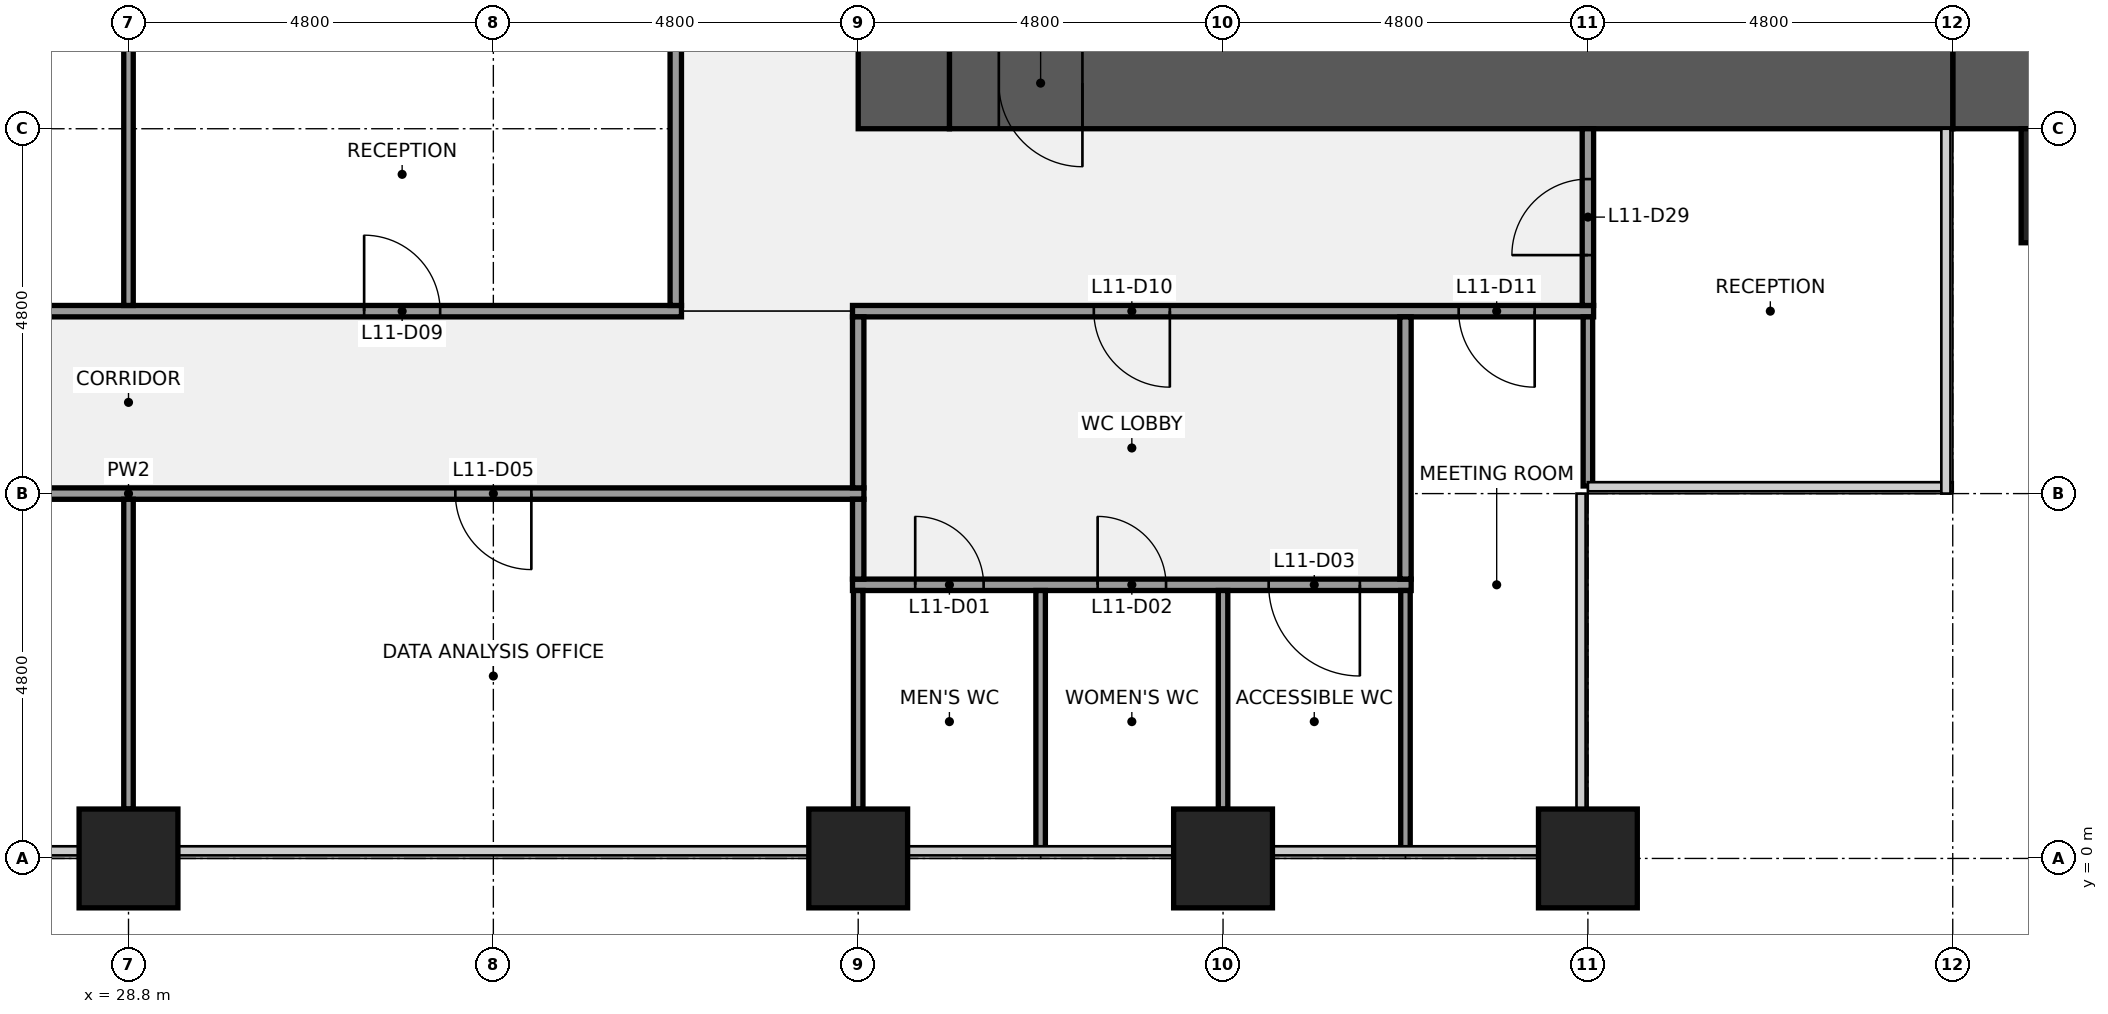
"""IFC4 building model, lengths in metres.
Left out: names, types, materials, properties, quantities, classifications, styles, units other than length and angle.
Written with IfcOpenShell. Run it as: python <this file> out.ifc"""

import sys

from ifc_helpers import new_model, si_unit, direction, frame, frame_2d, origin, origin_2d, place, context, subcontext, project, spatial, rectangle, extrude, element, fill, save


model = new_model("IFC4")
c1 = context("Model", 3, precision=1e-05, world=origin(), true_north=direction((0.0, 1.0)))
c2 = subcontext(c1, "Body", "Model", "MODEL_VIEW")
j1 = project(units=[si_unit("LENGTHUNIT", "METRE"), si_unit("PLANEANGLEUNIT", "RADIAN")], contexts=[c1])
p1 = place(None, origin())
s1 = spatial("IfcSite", under=j1, at=p1, CompositionType="ELEMENT")
p2 = place(p1, origin())
s2 = spatial("IfcBuilding", under=s1, at=p2, CompositionType="ELEMENT")
p3 = place(p2, frame((0.0, 0.0, 55.0)))
s3 = spatial("IfcBuildingStorey", under=s2, at=p3, CompositionType="ELEMENT", Elevation=55.0)
for number, where, z_axis, x_axis in (
    (1, (28.8, 0.0, 0.0), (0.0, 0.0, 1.0), (1.0, 0.0, 0.0)),
    (2, (38.4, 0.0, 0.0), (0.0, 0.0, 1.0), (1.0, 0.0, 0.0)),
    (3, (43.2, 0.0, 0.0), (0.0, 0.0, 1.0), (1.0, 0.0, 0.0)),
    (4, (48.0, 0.0, 0.0), (0.0, 0.0, 1.0), (1.0, 0.0, 0.0)),
):
    element("IfcColumn", number, at=place(p3, frame(where, z_axis=z_axis, x_axis=x_axis)), inside=s3, PredefinedType="COLUMN", context=c2, shape_type="SweptSolid", body=[
        extrude(rectangle(XDim=1.3, YDim=1.3, at=origin_2d()), origin(), (0.0, 0.0, 1.0), 4.0),
    ])
p4 = place(p3, frame((56.4, 10.2, 0.0), z_axis=(0.0, 0.0, 1.0), x_axis=(-1.0, 0.0, 0.0)))
e5 = element("IfcWall", 5, at=p4, inside=s3, PredefinedType="SHEAR", context=c2, shape_type="SweptSolid", body=[
    extrude(rectangle(XDim=3.6, YDim=1.2, at=frame_2d((1.8, 0.0))), origin(), (0.0, 0.0, 1.0), 3.84),
])
p5 = place(p3, frame((52.8, 10.2, 0.0), z_axis=(0.0, 0.0, 1.0), x_axis=(-1.0, 0.0, 0.0)))
e6 = element("IfcWall", 6, at=p5, inside=s3, PredefinedType="SHEAR", context=c2, shape_type="SweptSolid", body=[
    extrude(rectangle(XDim=13.2, YDim=1.2, at=frame_2d((6.6, 0.0))), origin(), (0.0, 0.0, 1.0), 3.84),
])
p6 = place(p5, frame((11.45, 0.0, 0.0)))
e7 = element("IfcOpeningElement", 7, at=p6, cuts=e6, PredefinedType="OPENING", context=c2, shape_type="SweptSolid", body=[
    extrude(rectangle(XDim=1.1, YDim=2.1, at=frame_2d((0.55, 1.05))), frame((0.0, 0.61, 0.0), z_axis=(0.0, -1.0, 0.0), x_axis=(1.0, 0.0, 0.0)), (0.0, 0.0, 1.0), 1.22),
])
p7 = place(p3, frame((39.0, 9.6, 0.0), z_axis=(0.0, 0.0, 1.0), x_axis=(0.0, 1.0, 0.0)))
e8 = element("IfcWall", 8, at=p7, inside=s3, PredefinedType="SHEAR", context=c2, shape_type="SweptSolid", body=[
    extrude(rectangle(XDim=28.8, YDim=1.2, at=frame_2d((14.4, 0.0))), origin(), (0.0, 0.0, 1.0), 3.84),
])
p8 = place(p7, frame((8.7, 0.0, 0.0)))
e9 = element("IfcOpeningElement", 9, at=p8, cuts=e8, PredefinedType="OPENING", context=c2, shape_type="SweptSolid", body=[
    extrude(rectangle(XDim=1.8, YDim=2.1, at=frame_2d((0.9, 1.05))), frame((0.0, 0.61, 0.0), z_axis=(0.0, -1.0, 0.0), x_axis=(1.0, 0.0, 0.0)), (0.0, 0.0, 1.0), 1.22),
])
p9 = place(p7, frame((18.3, 0.0, 0.0)))
e10 = element("IfcOpeningElement", 10, at=p9, cuts=e8, PredefinedType="OPENING", context=c2, shape_type="SweptSolid", body=[
    extrude(rectangle(XDim=1.8, YDim=2.1, at=frame_2d((0.9, 1.05))), frame((0.0, 0.61, 0.0), z_axis=(0.0, -1.0, 0.0), x_axis=(1.0, 0.0, 0.0)), (0.0, 0.0, 1.0), 1.22),
])
p10 = place(p3, frame((38.325, 3.6, 0.0), z_axis=(0.0, 0.0, 1.0), x_axis=(1.0, 0.0, 0.0)))
e11 = element("IfcWall", 11, at=p10, inside=s3, PredefinedType="PARTITIONING", context=c2, shape_type="SweptSolid", body=[
    extrude(rectangle(XDim=7.35, YDim=0.15, at=frame_2d((3.675, 0.0))), origin(), (0.0, 0.0, 1.0), 2.849),
])
p11 = place(p10, frame((0.825, 0.0, 0.0)))
e12 = element("IfcOpeningElement", 12, at=p11, cuts=e11, PredefinedType="OPENING", context=c2, shape_type="SweptSolid", body=[
    extrude(rectangle(XDim=0.9, YDim=2.1, at=frame_2d((0.45, 1.05))), frame((0.0, 0.085, 0.0), z_axis=(0.0, -1.0, 0.0), x_axis=(1.0, 0.0, 0.0)), (0.0, 0.0, 1.0), 0.17),
])
p12 = place(p10, frame((3.225, 0.0, 0.0)))
e13 = element("IfcOpeningElement", 13, at=p12, cuts=e11, PredefinedType="OPENING", context=c2, shape_type="SweptSolid", body=[
    extrude(rectangle(XDim=0.9, YDim=2.1, at=frame_2d((0.45, 1.05))), frame((0.0, 0.085, 0.0), z_axis=(0.0, -1.0, 0.0), x_axis=(1.0, 0.0, 0.0)), (0.0, 0.0, 1.0), 0.17),
])
p13 = place(p10, frame((5.475, 0.0, 0.0)))
e14 = element("IfcOpeningElement", 14, at=p13, cuts=e11, PredefinedType="OPENING", context=c2, shape_type="SweptSolid", body=[
    extrude(rectangle(XDim=1.2, YDim=2.1, at=frame_2d((0.6, 1.05))), frame((0.0, 0.085, 0.0), z_axis=(0.0, -1.0, 0.0), x_axis=(1.0, 0.0, 0.0)), (0.0, 0.0, 1.0), 0.17),
])
p14 = place(p3, frame((19.125, 4.8, 0.0), z_axis=(0.0, 0.0, 1.0), x_axis=(1.0, 0.0, 0.0)))
e15 = element("IfcWall", 15, at=p14, inside=s3, PredefinedType="PARTITIONING", context=c2, shape_type="SweptSolid", body=[
    extrude(rectangle(XDim=19.35, YDim=0.15, at=frame_2d((9.675, 0.0))), origin(), (0.0, 0.0, 1.0), 2.849),
])
p15 = place(p14, frame((4.375, 0.0, 0.0)))
e16 = element("IfcOpeningElement", 16, at=p15, cuts=e15, PredefinedType="OPENING", context=c2, shape_type="SweptSolid", body=[
    extrude(rectangle(XDim=1.0, YDim=2.1, at=frame_2d((0.5, 1.05))), frame((0.0, 0.085, 0.0), z_axis=(0.0, -1.0, 0.0), x_axis=(1.0, 0.0, 0.0)), (0.0, 0.0, 1.0), 0.17),
])
p16 = place(p14, frame((13.975, 0.0, 0.0)))
e17 = element("IfcOpeningElement", 17, at=p16, cuts=e15, PredefinedType="OPENING", context=c2, shape_type="SweptSolid", body=[
    extrude(rectangle(XDim=1.0, YDim=2.1, at=frame_2d((0.5, 1.05))), frame((0.0, 0.085, 0.0), z_axis=(0.0, -1.0, 0.0), x_axis=(1.0, 0.0, 0.0)), (0.0, 0.0, 1.0), 0.17),
])
p17 = place(p3, frame((21.525, 7.2, 0.0), z_axis=(0.0, 0.0, 1.0), x_axis=(1.0, 0.0, 0.0)))
e18 = element("IfcWall", 18, at=p17, inside=s3, PredefinedType="PARTITIONING", context=c2, shape_type="SweptSolid", body=[
    extrude(rectangle(XDim=14.55, YDim=0.15, at=frame_2d((7.275, 0.0))), origin(), (0.0, 0.0, 1.0), 2.849),
])
p18 = place(p17, frame((3.175, 0.0, 0.0)))
e19 = element("IfcOpeningElement", 19, at=p18, cuts=e18, PredefinedType="OPENING", context=c2, shape_type="SweptSolid", body=[
    extrude(rectangle(XDim=1.0, YDim=2.1, at=frame_2d((0.5, 1.05))), frame((0.0, 0.085, 0.0), z_axis=(0.0, -1.0, 0.0), x_axis=(1.0, 0.0, 0.0)), (0.0, 0.0, 1.0), 0.17),
])
p19 = place(p17, frame((10.375, 0.0, 0.0)))
e20 = element("IfcOpeningElement", 20, at=p19, cuts=e18, PredefinedType="OPENING", context=c2, shape_type="SweptSolid", body=[
    extrude(rectangle(XDim=1.0, YDim=2.1, at=frame_2d((0.5, 1.05))), frame((0.0, 0.085, 0.0), z_axis=(0.0, -1.0, 0.0), x_axis=(1.0, 0.0, 0.0)), (0.0, 0.0, 1.0), 0.17),
])
p20 = place(p3, frame((38.325, 7.2, 0.0), z_axis=(0.0, 0.0, 1.0), x_axis=(1.0, 0.0, 0.0)))
e21 = element("IfcWall", 21, at=p20, inside=s3, PredefinedType="PARTITIONING", context=c2, shape_type="SweptSolid", body=[
    extrude(rectangle(XDim=9.75, YDim=0.15, at=frame_2d((4.875, 0.0))), origin(), (0.0, 0.0, 1.0), 2.849),
])
p21 = place(p20, frame((3.175, 0.0, 0.0)))
e22 = element("IfcOpeningElement", 22, at=p21, cuts=e21, PredefinedType="OPENING", context=c2, shape_type="SweptSolid", body=[
    extrude(rectangle(XDim=1.0, YDim=2.1, at=frame_2d((0.5, 1.05))), frame((0.0, 0.085, 0.0), z_axis=(0.0, -1.0, 0.0), x_axis=(1.0, 0.0, 0.0)), (0.0, 0.0, 1.0), 0.17),
])
p22 = place(p20, frame((7.975, 0.0, 0.0)))
e23 = element("IfcOpeningElement", 23, at=p22, cuts=e21, PredefinedType="OPENING", context=c2, shape_type="SweptSolid", body=[
    extrude(rectangle(XDim=1.0, YDim=2.1, at=frame_2d((0.5, 1.05))), frame((0.0, 0.085, 0.0), z_axis=(0.0, -1.0, 0.0), x_axis=(1.0, 0.0, 0.0)), (0.0, 0.0, 1.0), 0.17),
])
p23 = place(p3, frame((28.8, 0.65, 0.0), z_axis=(0.0, 0.0, 1.0), x_axis=(0.0, 1.0, 0.0)))
e24 = element("IfcWall", 24, at=p23, inside=s3, PredefinedType="PARTITIONING", context=c2, shape_type="SweptSolid", body=[
    extrude(rectangle(XDim=4.075, YDim=0.125, at=frame_2d((2.038, 0.0))), origin(), (0.0, 0.0, 1.0), 2.849),
])
p24 = place(p3, frame((28.8, 7.275, 0.0), z_axis=(0.0, 0.0, 1.0), x_axis=(0.0, 1.0, 0.0)))
e25 = element("IfcWall", 25, at=p24, inside=s3, PredefinedType="PARTITIONING", context=c2, shape_type="SweptSolid", body=[
    extrude(rectangle(XDim=3.463, YDim=0.125, at=frame_2d((1.731, 0.0))), origin(), (0.0, 0.0, 1.0), 2.849),
])
p25 = place(p3, frame((36.0, 7.275, 0.0), z_axis=(0.0, 0.0, 1.0), x_axis=(0.0, 1.0, 0.0)))
e26 = element("IfcWall", 26, at=p25, inside=s3, PredefinedType="PARTITIONING", context=c2, shape_type="SweptSolid", body=[
    extrude(rectangle(XDim=3.463, YDim=0.15, at=frame_2d((1.731, 0.0))), origin(), (0.0, 0.0, 1.0), 2.849),
])
p26 = place(p3, frame((38.4, 0.65, 0.0), z_axis=(0.0, 0.0, 1.0), x_axis=(0.0, 1.0, 0.0)))
e27 = element("IfcWall", 27, at=p26, inside=s3, PredefinedType="PARTITIONING", context=c2, shape_type="SweptSolid", body=[
    extrude(rectangle(XDim=2.875, YDim=0.125, at=frame_2d((1.438, 0.0))), origin(), (0.0, 0.0, 1.0), 2.849),
])
p27 = place(p3, frame((38.4, 3.675, 0.0), z_axis=(0.0, 0.0, 1.0), x_axis=(0.0, 1.0, 0.0)))
e28 = element("IfcWall", 28, at=p27, inside=s3, PredefinedType="PARTITIONING", context=c2, shape_type="SweptSolid", body=[
    extrude(rectangle(XDim=1.05, YDim=0.15, at=frame_2d((0.525, 0.0))), origin(), (0.0, 0.0, 1.0), 2.849),
])
p28 = place(p3, frame((38.4, 4.875, 0.0), z_axis=(0.0, 0.0, 1.0), x_axis=(0.0, 1.0, 0.0)))
e29 = element("IfcWall", 29, at=p28, inside=s3, PredefinedType="PARTITIONING", context=c2, shape_type="SweptSolid", body=[
    extrude(rectangle(XDim=2.25, YDim=0.15, at=frame_2d((1.125, 0.0))), origin(), (0.0, 0.0, 1.0), 2.849),
])
p29 = place(p3, frame((40.8, 0.1, 0.0), z_axis=(0.0, 0.0, 1.0), x_axis=(0.0, 1.0, 0.0)))
e30 = element("IfcWall", 30, at=p29, inside=s3, PredefinedType="PARTITIONING", context=c2, shape_type="SweptSolid", body=[
    extrude(rectangle(XDim=3.425, YDim=0.125, at=frame_2d((1.712, 0.0))), origin(), (0.0, 0.0, 1.0), 2.849),
])
p30 = place(p3, frame((43.2, 0.65, 0.0), z_axis=(0.0, 0.0, 1.0), x_axis=(0.0, 1.0, 0.0)))
e31 = element("IfcWall", 31, at=p30, inside=s3, PredefinedType="PARTITIONING", context=c2, shape_type="SweptSolid", body=[
    extrude(rectangle(XDim=2.875, YDim=0.125, at=frame_2d((1.438, 0.0))), origin(), (0.0, 0.0, 1.0), 2.849),
])
p31 = place(p3, frame((45.6, 0.1, 0.0), z_axis=(0.0, 0.0, 1.0), x_axis=(0.0, 1.0, 0.0)))
e32 = element("IfcWall", 32, at=p31, inside=s3, PredefinedType="PARTITIONING", context=c2, shape_type="SweptSolid", body=[
    extrude(rectangle(XDim=3.425, YDim=0.125, at=frame_2d((1.712, 0.0))), origin(), (0.0, 0.0, 1.0), 2.849),
])
p32 = place(p3, frame((45.6, 3.675, 0.0), z_axis=(0.0, 0.0, 1.0), x_axis=(0.0, 1.0, 0.0)))
e33 = element("IfcWall", 33, at=p32, inside=s3, PredefinedType="PARTITIONING", context=c2, shape_type="SweptSolid", body=[
    extrude(rectangle(XDim=3.45, YDim=0.15, at=frame_2d((1.725, 0.0))), origin(), (0.0, 0.0, 1.0), 2.849),
])
p33 = place(p3, frame((48.0, 4.9, 0.0), z_axis=(0.0, 0.0, 1.0), x_axis=(0.0, 1.0, 0.0)))
e34 = element("IfcWall", 34, at=p33, inside=s3, PredefinedType="PARTITIONING", context=c2, shape_type="SweptSolid", body=[
    extrude(rectangle(XDim=2.225, YDim=0.125, at=frame_2d((1.113, 0.0))), origin(), (0.0, 0.0, 1.0), 2.849),
])
p34 = place(p3, frame((48.0, 7.275, 0.0), z_axis=(0.0, 0.0, 1.0), x_axis=(0.0, 1.0, 0.0)))
e35 = element("IfcWall", 35, at=p34, inside=s3, PredefinedType="PARTITIONING", context=c2, shape_type="SweptSolid", body=[
    extrude(rectangle(XDim=2.325, YDim=0.15, at=frame_2d((1.163, 0.0))), origin(), (0.0, 0.0, 1.0), 2.849),
])
p35 = place(p34, frame((0.663, 0.0, 0.0)))
e36 = element("IfcOpeningElement", 36, at=p35, cuts=e35, PredefinedType="OPENING", context=c2, shape_type="SweptSolid", body=[
    extrude(rectangle(XDim=1.0, YDim=2.1, at=frame_2d((0.5, 1.05))), frame((0.0, 0.085, 0.0), z_axis=(0.0, -1.0, 0.0), x_axis=(1.0, 0.0, 0.0)), (0.0, 0.0, 1.0), 0.17),
])
p36 = place(p3, frame((55.2, 8.85, 0.0), z_axis=(0.0, 0.0, 1.0), x_axis=(1.0, 0.0, 0.0)))
e37 = element("IfcColumn", 37, at=p36, inside=s3, PredefinedType="PILASTER", context=c2, shape_type="SweptSolid", body=[
    extrude(rectangle(XDim=3.0, YDim=1.5, at=origin_2d()), origin(), (0.0, 0.0, 1.0), 4.0),
])
for number, where, z_axis, x_axis in (
    (38, (38.4, -1.075, 0.0), (0.0, 0.0, 1.0), (1.0, 0.0, 0.0)),
    (39, (43.2, -1.075, 0.0), (0.0, 0.0, 1.0), (1.0, 0.0, 0.0)),
    (40, (48.0, -1.075, 0.0), (0.0, 0.0, 1.0), (1.0, 0.0, 0.0)),
):
    element("IfcColumn", number, at=place(p3, frame(where, z_axis=z_axis, x_axis=x_axis)), inside=s3, PredefinedType="PILASTER", context=c2, shape_type="SweptSolid", body=[
        extrude(rectangle(XDim=4.2, YDim=0.85, at=origin_2d()), origin(), (0.0, 0.0, 1.0), 4.0),
    ])
p37 = place(p6, origin())
e41 = element("IfcDoor", 41, at=p37, inside=s3, OperationType="SINGLE_SWING_LEFT", PredefinedType="DOOR", context=c2, shape_type="SweptSolid", body=[
    extrude(rectangle(XDim=1.1, YDim=2.1, at=frame_2d((0.55, 1.05))), frame((0.0, 0.025, 0.0), z_axis=(0.0, -1.0, 0.0), x_axis=(1.0, 0.0, 0.0)), (0.0, 0.0, 1.0), 0.05),
])
fill(e7, e41)
p38 = place(p11, origin())
e42 = element("IfcDoor", 42, at=p38, inside=s3, OperationType="SINGLE_SWING_LEFT", PredefinedType="DOOR", context=c2, shape_type="SweptSolid", body=[
    extrude(rectangle(XDim=0.9, YDim=2.1, at=frame_2d((0.45, 1.05))), frame((0.0, 0.025, 0.0), z_axis=(0.0, -1.0, 0.0), x_axis=(1.0, 0.0, 0.0)), (0.0, 0.0, 1.0), 0.05),
])
fill(e12, e42)
p39 = place(p12, origin())
e43 = element("IfcDoor", 43, at=p39, inside=s3, OperationType="SINGLE_SWING_LEFT", PredefinedType="DOOR", context=c2, shape_type="SweptSolid", body=[
    extrude(rectangle(XDim=0.9, YDim=2.1, at=frame_2d((0.45, 1.05))), frame((0.0, 0.025, 0.0), z_axis=(0.0, -1.0, 0.0), x_axis=(1.0, 0.0, 0.0)), (0.0, 0.0, 1.0), 0.05),
])
fill(e13, e43)
p40 = place(p13, origin())
e44 = element("IfcDoor", 44, at=p40, inside=s3, OperationType="SINGLE_SWING_RIGHT", PredefinedType="DOOR", context=c2, shape_type="SweptSolid", body=[
    extrude(rectangle(XDim=1.2, YDim=2.1, at=frame_2d((0.6, 1.05))), frame((0.0, 0.025, 0.0), z_axis=(0.0, -1.0, 0.0), x_axis=(1.0, 0.0, 0.0)), (0.0, 0.0, 1.0), 0.05),
])
fill(e14, e44)
p41 = place(p16, origin())
e45 = element("IfcDoor", 45, at=p41, inside=s3, OperationType="SINGLE_SWING_RIGHT", PredefinedType="DOOR", context=c2, shape_type="SweptSolid", body=[
    extrude(rectangle(XDim=1.0, YDim=2.1, at=frame_2d((0.5, 1.05))), frame((0.0, 0.025, 0.0), z_axis=(0.0, -1.0, 0.0), x_axis=(1.0, 0.0, 0.0)), (0.0, 0.0, 1.0), 0.05),
])
fill(e17, e45)
p42 = place(p19, origin())
e46 = element("IfcDoor", 46, at=p42, inside=s3, OperationType="SINGLE_SWING_LEFT", PredefinedType="DOOR", context=c2, shape_type="SweptSolid", body=[
    extrude(rectangle(XDim=1.0, YDim=2.1, at=frame_2d((0.5, 1.05))), frame((0.0, 0.025, 0.0), z_axis=(0.0, -1.0, 0.0), x_axis=(1.0, 0.0, 0.0)), (0.0, 0.0, 1.0), 0.05),
])
fill(e20, e46)
p43 = place(p21, origin())
e47 = element("IfcDoor", 47, at=p43, inside=s3, OperationType="SINGLE_SWING_RIGHT", PredefinedType="DOOR", context=c2, shape_type="SweptSolid", body=[
    extrude(rectangle(XDim=1.0, YDim=2.1, at=frame_2d((0.5, 1.05))), frame((0.0, 0.025, 0.0), z_axis=(0.0, -1.0, 0.0), x_axis=(1.0, 0.0, 0.0)), (0.0, 0.0, 1.0), 0.05),
])
fill(e22, e47)
p44 = place(p22, origin())
e48 = element("IfcDoor", 48, at=p44, inside=s3, OperationType="SINGLE_SWING_RIGHT", PredefinedType="DOOR", context=c2, shape_type="SweptSolid", body=[
    extrude(rectangle(XDim=1.0, YDim=2.1, at=frame_2d((0.5, 1.05))), frame((0.0, 0.025, 0.0), z_axis=(0.0, -1.0, 0.0), x_axis=(1.0, 0.0, 0.0)), (0.0, 0.0, 1.0), 0.05),
])
fill(e23, e48)
p45 = place(p35, origin())
e49 = element("IfcDoor", 49, at=p45, inside=s3, OperationType="SINGLE_SWING_LEFT", PredefinedType="DOOR", context=c2, shape_type="SweptSolid", body=[
    extrude(rectangle(XDim=1.0, YDim=2.1, at=frame_2d((0.5, 1.05))), frame((0.0, 0.025, 0.0), z_axis=(0.0, -1.0, 0.0), x_axis=(1.0, 0.0, 0.0)), (0.0, 0.0, 1.0), 0.05),
])
fill(e36, e49)
save(model, sys.argv[1])
